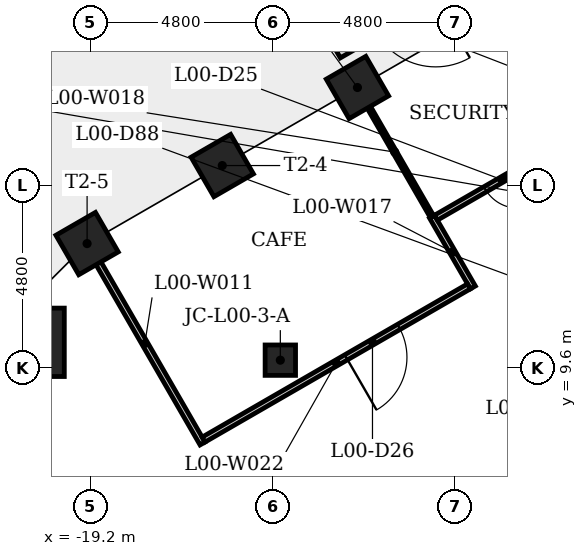
"""IFC4 building model, lengths in metres.
Left out: names, types, materials, properties, quantities, classifications, styles, units other than length and angle.
Written with IfcOpenShell. Run it as: python <this file> out.ifc"""

import sys

from ifc_helpers import new_model, si_unit, direction, frame, frame_2d, origin, origin_2d, place, context, subcontext, project, spatial, rectangle, extrude, element, fill, save


model = new_model("IFC4")
c1 = context("Model", 3, precision=1e-05, world=origin(), true_north=direction((0.0, 1.0)))
c2 = subcontext(c1, "Body", "Model", "MODEL_VIEW")
j1 = project(units=[si_unit("LENGTHUNIT", "METRE"), si_unit("PLANEANGLEUNIT", "RADIAN")], contexts=[c1])
p1 = place(None, origin())
s1 = spatial("IfcSite", under=j1, at=p1, CompositionType="ELEMENT")
p2 = place(p1, origin())
s2 = spatial("IfcBuilding", under=s1, at=p2, CompositionType="ELEMENT")
p3 = place(p2, origin())
s3 = spatial("IfcBuildingStorey", under=s2, at=p3, CompositionType="ELEMENT", Elevation=0.0)
p4 = place(p3, frame((0.2, 10.623, -0.5), z_axis=(0.0, 0.0, 1.0), x_axis=(-0.866023993627, -0.500002442456, 0.0)))
e1 = element("IfcWall", 1, at=p4, inside=s3, PredefinedType="SHEAR", context=c2, shape_type="SweptSolid", body=[
    extrude(rectangle(XDim=10.97, YDim=0.8, at=frame_2d((5.485, 0.0))), origin(), (0.0, 0.0, 1.0), 7.5),
])
p5 = place(p4, frame((6.877, 0.0, 0.5)))
e2 = element("IfcOpeningElement", 2, at=p5, cuts=e1, PredefinedType="OPENING", context=c2, shape_type="SweptSolid", body=[
    extrude(rectangle(XDim=0.9, YDim=2.1, at=frame_2d((0.45, 1.05))), frame((0.0, 0.41, 0.0), z_axis=(0.0, -1.0, 0.0), x_axis=(1.0, 0.0, 0.0)), (0.0, 0.0, 1.0), 0.82),
])
for number, where, z_axis, x_axis in (
    (3, (-12.171, 16.973, -0.5), (0.0, 0.0, 1.0), (-0.5, 0.866, 0.0)),
    (4, (-15.728, 14.92, -0.5), (0.0, 0.0, 1.0), (-0.5, 0.866, 0.0)),
    (5, (-19.285, 12.866, -0.5), (0.0, 0.0, 1.0), (-0.5, 0.866, 0.0)),
):
    element("IfcColumn", number, at=place(p3, frame(where, z_axis=z_axis, x_axis=x_axis)), inside=s3, PredefinedType="COLUMN", context=c2, shape_type="SweptSolid", body=[
        extrude(rectangle(XDim=1.2, YDim=1.2, at=origin_2d()), origin(), (0.0, 0.0, 1.0), 7.5),
    ])
p6 = place(p3, frame((-20.785, 10.268, -0.5), z_axis=(0.0, 0.0, 1.0), x_axis=(-1.0, 0.0, 0.0)))
e6 = element("IfcColumn", 6, at=p6, inside=s3, PredefinedType="COLUMN", context=c2, shape_type="SweptSolid", body=[
    extrude(rectangle(XDim=1.8, YDim=1.8, at=origin_2d()), origin(), (0.0, 0.0, 1.0), 7.5),
])
p7 = place(p3, frame((-14.2, 9.798, -0.5), z_axis=(0.0, 0.0, 1.0), x_axis=(-1.0, 0.0, 0.0)))
e7 = element("IfcColumn", 7, at=p7, inside=s3, PredefinedType="COLUMN", context=c2, shape_type="SweptSolid", body=[
    extrude(rectangle(XDim=0.8, YDim=0.8, at=origin_2d()), origin(), (0.0, 0.0, 1.0), 7.5),
])
p8 = place(p3, frame((-9.114, 19.893, 0.0), z_axis=(0.0, 0.0, 1.0), x_axis=(-0.866036113234, -0.499981450231, 0.0)))
e8 = element("IfcWall", 8, at=p8, inside=s3, PredefinedType="SOLIDWALL", context=c2, shape_type="SweptSolid", body=[
    extrude(rectangle(XDim=4.107, YDim=0.2, at=frame_2d((2.054, 0.0))), origin(), (0.0, 0.0, 1.0), 7.0),
])
p9 = place(p8, frame((1.154, 0.0, 0.0)))
e9 = element("IfcOpeningElement", 9, at=p9, cuts=e8, PredefinedType="OPENING", context=c2, shape_type="SweptSolid", body=[
    extrude(rectangle(XDim=1.8, YDim=2.6, at=frame_2d((0.9, 1.3))), frame((0.0, 0.11, 0.0), z_axis=(0.0, -1.0, 0.0), x_axis=(1.0, 0.0, 0.0)), (0.0, 0.0, 1.0), 0.22),
])
p10 = place(p8, frame((1.154, 0.0, 3.0)))
e10 = element("IfcOpeningElement", 10, at=p10, cuts=e8, PredefinedType="OPENING", context=c2, shape_type="SweptSolid", body=[
    extrude(rectangle(XDim=1.8, YDim=2.2, at=frame_2d((0.9, 1.1))), frame((0.0, 0.11, 0.0), z_axis=(0.0, -1.0, 0.0), x_axis=(1.0, 0.0, 0.0)), (0.0, 0.0, 1.0), 0.22),
])
p11 = place(p3, frame((-16.247, 7.605, 0.0), z_axis=(0.0, 0.0, 1.0), x_axis=(-0.500020467139, 0.866013586754, 0.0)))
e11 = element("IfcWall", 11, at=p11, inside=s3, PredefinedType="PARTITIONING", context=c2, shape_type="SweptSolid", body=[
    extrude(rectangle(XDim=6.075, YDim=0.15, at=frame_2d((3.038, 0.0))), origin(), (0.0, 0.0, 1.0), 6.6),
])
p12 = place(p3, frame((-10.208, 13.574, 0.0), z_axis=(0.0, 0.0, 1.0), x_axis=(0.499961633463, -0.866047553582, 0.0)))
e12 = element("IfcWall", 12, at=p12, inside=s3, PredefinedType="PARTITIONING", context=c2, shape_type="SweptSolid", body=[
    extrude(rectangle(XDim=2.15, YDim=0.15, at=frame_2d((1.075, 0.0))), origin(), (0.0, 0.0, 1.0), 6.6),
])
p13 = place(p3, frame((-10.208, 13.574, 0.0), z_axis=(0.0, 0.0, 1.0), x_axis=(-0.500052695525, 0.865994977871, 0.0)))
e13 = element("IfcWall", 13, at=p13, inside=s3, PredefinedType="PARTITIONING", context=c2, shape_type="SweptSolid", body=[
    extrude(rectangle(XDim=3.925, YDim=0.1, at=frame_2d((1.962, 0.0))), origin(), (0.0, 0.0, 1.0), 6.6),
])
p14 = place(p3, frame((-9.236, 11.74, 0.0), z_axis=(0.0, 0.0, 1.0), x_axis=(-0.86604190943, -0.499971410293, 0.0)))
e14 = element("IfcWall", 14, at=p14, inside=s3, PredefinedType="PARTITIONING", context=c2, shape_type="SweptSolid", body=[
    extrude(rectangle(XDim=8.064, YDim=0.15, at=frame_2d((4.032, 0.0))), origin(), (0.0, 0.0, 1.0), 6.6),
])
p15 = place(p14, frame((2.132, 0.0, 0.0)))
e15 = element("IfcOpeningElement", 15, at=p15, cuts=e14, PredefinedType="OPENING", context=c2, shape_type="SweptSolid", body=[
    extrude(rectangle(XDim=1.6, YDim=2.1, at=frame_2d((0.8, 1.05))), frame((0.0, 0.085, 0.0), z_axis=(0.0, -1.0, 0.0), x_axis=(1.0, 0.0, 0.0)), (0.0, 0.0, 1.0), 0.17),
])
p16 = place(p3, frame((-6.549, 15.6, 0.0), z_axis=(0.0, 0.0, 1.0), x_axis=(-0.866036113234, -0.499981450231, 0.0)))
e16 = element("IfcWall", 16, at=p16, inside=s3, PredefinedType="PARTITIONING", context=c2, shape_type="SweptSolid", body=[
    extrude(rectangle(XDim=4.107, YDim=0.15, at=frame_2d((2.054, 0.0))), origin(), (0.0, 0.0, 1.0), 6.6),
])
p17 = place(p16, frame((1.606, 0.0, 0.0)))
e17 = element("IfcOpeningElement", 17, at=p17, cuts=e16, PredefinedType="OPENING", context=c2, shape_type="SweptSolid", body=[
    extrude(rectangle(XDim=1.0, YDim=2.1, at=frame_2d((0.5, 1.05))), frame((0.0, 0.085, 0.0), z_axis=(0.0, -1.0, 0.0), x_axis=(1.0, 0.0, 0.0)), (0.0, 0.0, 1.0), 0.17),
])
p18 = place(p3, frame((-6.651, 15.628, 0.0), z_axis=(0.0, 0.0, 1.0), x_axis=(-0.499979109433, 0.866037464623, 0.0)))
e18 = element("IfcWall", 18, at=p18, inside=s3, PredefinedType="PARTITIONING", context=c2, shape_type="SweptSolid", body=[
    extrude(rectangle(XDim=3.925, YDim=0.1, at=frame_2d((1.962, 0.0))), origin(), (0.0, 0.0, 1.0), 6.6),
])
p19 = place(p17, origin())
e19 = element("IfcDoor", 19, at=p19, inside=s3, OperationType="SINGLE_SWING_LEFT", PredefinedType="DOOR", context=c2, shape_type="SweptSolid", body=[
    extrude(rectangle(XDim=1.0, YDim=2.1, at=frame_2d((0.5, 1.05))), frame((0.0, 0.025, 0.0), z_axis=(0.0, -1.0, 0.0), x_axis=(1.0, 0.0, 0.0)), (0.0, 0.0, 1.0), 0.05),
])
fill(e17, e19)
p20 = place(p15, origin())
e20 = element("IfcDoor", 20, at=p20, inside=s3, OperationType="SINGLE_SWING_RIGHT", PredefinedType="DOOR", context=c2, shape_type="SweptSolid", body=[
    extrude(rectangle(XDim=1.6, YDim=2.1, at=frame_2d((0.8, 1.05))), frame((0.0, 0.025, 0.0), z_axis=(0.0, -1.0, 0.0), x_axis=(1.0, 0.0, 0.0)), (0.0, 0.0, 1.0), 0.05),
])
fill(e15, e20)
save(model, sys.argv[1])
